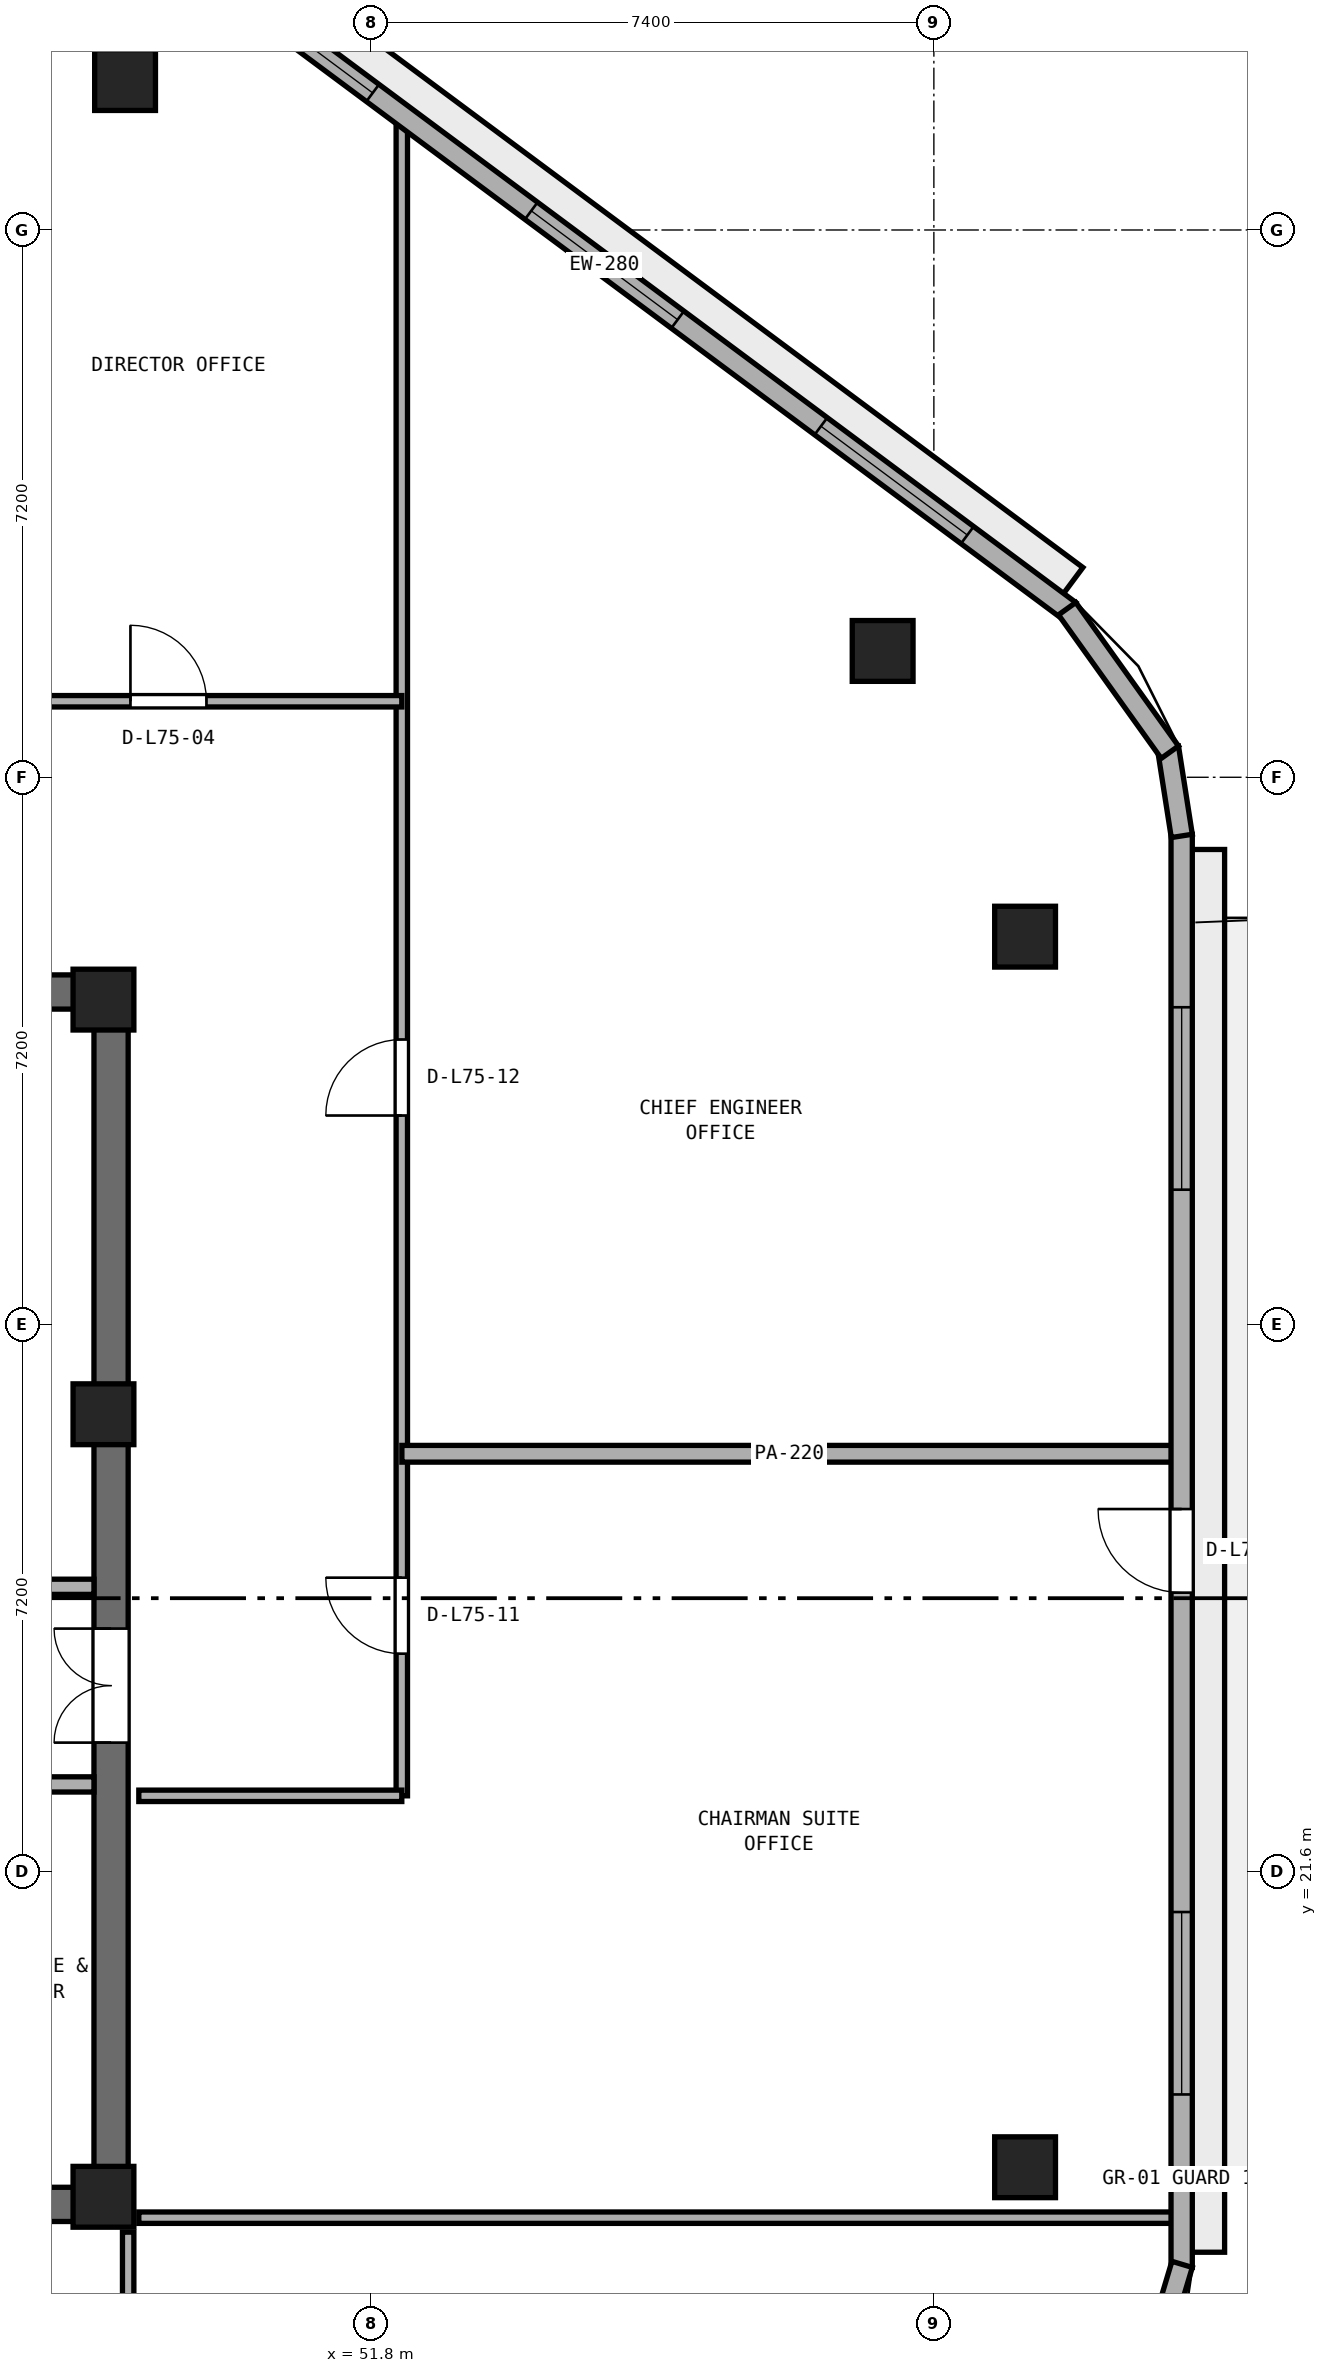
"""IFC4 building model, lengths in metres.
Left out: names, types, materials, properties, quantities, classifications, styles, units other than length and angle.
Written with IfcOpenShell. Run it as: python <this file> out.ifc"""

import sys

from ifc_helpers import new_model, si_unit, direction, frame, frame_2d, origin, origin_2d, place, context, subcontext, project, spatial, rectangle, extrude, element, fill, save


model = new_model("IFC4")
c1 = context("Model", 3, precision=1e-05, world=origin(), true_north=direction((0.0, 1.0)))
c2 = subcontext(c1, "Body", "Model", "MODEL_VIEW")
j1 = project(units=[si_unit("LENGTHUNIT", "METRE"), si_unit("PLANEANGLEUNIT", "RADIAN")], contexts=[c1])
p1 = place(None, origin())
s1 = spatial("IfcSite", under=j1, at=p1, CompositionType="ELEMENT")
p2 = place(p1, origin())
s2 = spatial("IfcBuilding", under=s1, at=p2, CompositionType="ELEMENT")
p3 = place(p2, frame((0.0, 0.0, 293.4)))
s3 = spatial("IfcBuildingStorey", under=s2, at=p3, CompositionType="ELEMENT", Elevation=293.4)
for number, where, z_axis, x_axis in (
    (1, (25.4, 17.225, 0.0), (0.0, 0.0, 1.0), (1.0, 0.0, 0.0)),
    (2, (25.4, 33.175, 0.0), (0.0, 0.0, 1.0), (1.0, 0.0, 0.0)),
):
    element("IfcWall", number, at=place(p3, frame(where, z_axis=z_axis, x_axis=x_axis)), inside=s3, PredefinedType="SHEAR", context=c2, shape_type="SweptSolid", body=[
        extrude(rectangle(XDim=23.2, YDim=0.45, at=frame_2d((11.6, 0.0))), origin(), (0.0, 0.0, 1.0), 3.54),
    ])
p4 = place(p3, frame((48.375, 17.45, 0.0), z_axis=(0.0, 0.0, 1.0), x_axis=(0.0, 1.0, 0.0)))
e3 = element("IfcWall", 3, at=p4, inside=s3, PredefinedType="SHEAR", context=c2, shape_type="SweptSolid", body=[
    extrude(rectangle(XDim=15.5, YDim=0.45, at=frame_2d((7.75, 0.0))), origin(), (0.0, 0.0, 1.0), 3.54),
])
p5 = place(p4, frame((5.85, 0.0, 0.0)))
e4 = element("IfcOpeningElement", 4, at=p5, cuts=e3, PredefinedType="OPENING", context=c2, shape_type="SweptSolid", body=[
    extrude(rectangle(XDim=1.5, YDim=2.15, at=frame_2d((0.75, 1.075))), frame((0.0, 0.235, 0.0), z_axis=(0.0, -1.0, 0.0), x_axis=(1.0, 0.0, 0.0)), (0.0, 0.0, 1.0), 0.47),
])
for number, where, z_axis, x_axis in (
    (5, (48.275, 17.325, 0.0), (0.0, 0.0, 1.0), (1.0, 0.0, 0.0)),
    (6, (48.275, 27.62, 0.0), (0.0, 0.0, 1.0), (1.0, 0.0, 0.0)),
    (7, (48.275, 33.075, 0.0), (0.0, 0.0, 1.0), (1.0, 0.0, 0.0)),
):
    element("IfcColumn", number, at=place(p3, frame(where, z_axis=z_axis, x_axis=x_axis)), inside=s3, PredefinedType="PILASTER", context=c2, shape_type="SweptSolid", body=[
        extrude(rectangle(XDim=0.8, YDim=0.8, at=origin_2d()), origin(), (0.0, 0.0, 1.0), 3.8),
    ])
for number, where, z_axis, x_axis in (
    (8, (60.4, 17.714, 0.0), (0.0, 0.0, 1.0), (1.0, 0.0, 0.0)),
    (9, (60.4, 33.903, 0.0), (0.0, 0.0, 1.0), (1.0, 0.0, 0.0)),
    (10, (58.526, 37.662, 0.0), (0.0, 0.0, 1.0), (1.0, 0.0, 0.0)),
    (11, (48.559, 45.173, 0.0), (0.0, 0.0, 1.0), (1.0, 0.0, 0.0)),
):
    element("IfcColumn", number, at=place(p3, frame(where, z_axis=z_axis, x_axis=x_axis)), inside=s3, PredefinedType="COLUMN", context=c2, shape_type="SweptSolid", body=[
        extrude(rectangle(XDim=0.8, YDim=0.8, at=origin_2d()), origin(), (0.0, 0.0, 1.0), 3.8),
    ])
p6 = place(p3, frame((42.0, 22.75, 0.0), z_axis=(0.0, 0.0, 1.0), x_axis=(1.0, 0.0, 0.0)))
e12 = element("IfcWall", 12, at=p6, inside=s3, PredefinedType="SOLIDWALL", context=c2, shape_type="SweptSolid", body=[
    extrude(rectangle(XDim=6.15, YDim=0.2, at=frame_2d((3.075, 0.0))), origin(), (0.0, 0.0, 1.0), 3.54),
])
p7 = place(p3, frame((46.1, 25.35, 0.0), z_axis=(0.0, 0.0, 1.0), x_axis=(1.0, 0.0, 0.0)))
e13 = element("IfcWall", 13, at=p7, inside=s3, PredefinedType="SOLIDWALL", context=c2, shape_type="SweptSolid", body=[
    extrude(rectangle(XDim=2.05, YDim=0.2, at=frame_2d((1.025, 0.0))), origin(), (0.0, 0.0, 1.0), 3.54),
])
p8 = place(p3, frame((52.2, 22.6, 0.0), z_axis=(0.0, 0.0, 1.0), x_axis=(0.0, 1.0, 0.0)))
e14 = element("IfcWall", 14, at=p8, inside=s3, PredefinedType="PARTITIONING", context=c2, shape_type="SweptSolid", body=[
    extrude(rectangle(XDim=22.153, YDim=0.15, at=frame_2d((11.076, 0.0))), origin(), (0.0, 0.0, 1.0), 3.54),
])
p9 = place(p8, frame((1.87, 0.0, 0.0)))
e15 = element("IfcOpeningElement", 15, at=p9, cuts=e14, PredefinedType="OPENING", context=c2, shape_type="SweptSolid", body=[
    extrude(rectangle(XDim=1.0, YDim=2.12, at=frame_2d((0.5, 1.06))), frame((0.0, 0.085, 0.0), z_axis=(0.0, -1.0, 0.0), x_axis=(1.0, 0.0, 0.0)), (0.0, 0.0, 1.0), 0.17),
])
p10 = place(p8, frame((8.95, 0.0, 0.0)))
e16 = element("IfcOpeningElement", 16, at=p10, cuts=e14, PredefinedType="OPENING", context=c2, shape_type="SweptSolid", body=[
    extrude(rectangle(XDim=1.0, YDim=2.12, at=frame_2d((0.5, 1.06))), frame((0.0, 0.085, 0.0), z_axis=(0.0, -1.0, 0.0), x_axis=(1.0, 0.0, 0.0)), (0.0, 0.0, 1.0), 0.17),
])
p11 = place(p3, frame((48.6, 13.4, 0.0), z_axis=(0.0, 0.0, 1.0), x_axis=(0.0, 1.0, 0.0)))
e17 = element("IfcWall", 17, at=p11, inside=s3, PredefinedType="PARTITIONING", context=c2, shape_type="SweptSolid", body=[
    extrude(rectangle(XDim=3.46, YDim=0.15, at=frame_2d((1.73, 0.0))), origin(), (0.0, 0.0, 1.0), 3.54),
])
p12 = place(p3, frame((48.74, 17.05, 0.0), z_axis=(0.0, 0.0, 1.0), x_axis=(1.0, 0.0, 0.0)))
e18 = element("IfcWall", 18, at=p12, inside=s3, PredefinedType="PARTITIONING", context=c2, shape_type="SweptSolid", body=[
    extrude(rectangle(XDim=13.655, YDim=0.15, at=frame_2d((6.828, 0.0))), origin(), (0.0, 0.0, 1.0), 2.923),
])
p13 = place(p3, frame((48.74, 22.6, 0.0), z_axis=(0.0, 0.0, 1.0), x_axis=(1.0, 0.0, 0.0)))
e19 = element("IfcWall", 19, at=p13, inside=s3, PredefinedType="PARTITIONING", context=c2, shape_type="SweptSolid", body=[
    extrude(rectangle(XDim=3.46, YDim=0.15, at=frame_2d((1.73, 0.0))), origin(), (0.0, 0.0, 1.0), 3.54),
])
p14 = place(p3, frame((52.201, 27.1, 0.0), z_axis=(0.0, 0.0, 1.0), x_axis=(1.0, 0.0, 0.0)))
e20 = element("IfcWall", 20, at=p14, inside=s3, PredefinedType="PARTITIONING", context=c2, shape_type="SweptSolid", body=[
    extrude(rectangle(XDim=10.194, YDim=0.22, at=frame_2d((5.097, 0.0))), origin(), (0.0, 0.0, 1.0), 3.54),
])
p15 = place(p3, frame((38.35, 37.0, 0.0), z_axis=(0.0, 0.0, 1.0), x_axis=(1.0, 0.0, 0.0)))
e21 = element("IfcWall", 21, at=p15, inside=s3, PredefinedType="PARTITIONING", context=c2, shape_type="SweptSolid", body=[
    extrude(rectangle(XDim=13.85, YDim=0.15, at=frame_2d((6.925, 0.0))), origin(), (0.0, 0.0, 1.0), 3.54),
])
p16 = place(p15, frame((10.28, 0.0, 0.0)))
e22 = element("IfcOpeningElement", 22, at=p16, cuts=e21, PredefinedType="OPENING", context=c2, shape_type="SweptSolid", body=[
    extrude(rectangle(XDim=1.0, YDim=2.12, at=frame_2d((0.5, 1.06))), frame((0.0, 0.085, 0.0), z_axis=(0.0, -1.0, 0.0), x_axis=(1.0, 0.0, 0.0)), (0.0, 0.0, 1.0), 0.17),
])
p17 = place(p3, frame((62.46, 16.396, 0.0), z_axis=(0.0, 0.0, 1.0), x_axis=(0.0, 1.0, 0.0)))
e23 = element("IfcWall", 23, at=p17, inside=s3, PredefinedType="STANDARD", context=c2, shape_type="SweptSolid", body=[
    extrude(rectangle(XDim=18.854, YDim=0.28, at=frame_2d((9.427, 0.0))), origin(), (0.0, 0.0, 1.0), 3.54),
])
p18 = place(p17, frame((8.877, 0.0, 0.0)))
e24 = element("IfcOpeningElement", 24, at=p18, cuts=e23, PredefinedType="OPENING", context=c2, shape_type="SweptSolid", body=[
    extrude(rectangle(XDim=1.1, YDim=2.2, at=frame_2d((0.55, 1.1))), frame((0.0, 0.15, 0.0), z_axis=(0.0, -1.0, 0.0), x_axis=(1.0, 0.0, 0.0)), (0.0, 0.0, 1.0), 0.3),
])
p19 = place(p17, frame((2.276, 0.0, 0.9)))
e25 = element("IfcOpeningElement", 25, at=p19, cuts=e23, PredefinedType="OPENING", context=c2, shape_type="SweptSolid", body=[
    extrude(rectangle(XDim=2.4, YDim=1.75, at=frame_2d((1.2, 0.875))), frame((0.0, 0.15, 0.0), z_axis=(0.0, -1.0, 0.0), x_axis=(1.0, 0.0, 0.0)), (0.0, 0.0, 1.0), 0.3),
])
p20 = place(p17, frame((14.179, 0.0, 0.9)))
e26 = element("IfcOpeningElement", 26, at=p20, cuts=e23, PredefinedType="OPENING", context=c2, shape_type="SweptSolid", body=[
    extrude(rectangle(XDim=2.4, YDim=1.75, at=frame_2d((1.2, 0.875))), frame((0.0, 0.15, 0.0), z_axis=(0.0, -1.0, 0.0), x_axis=(1.0, 0.0, 0.0)), (0.0, 0.0, 1.0), 0.3),
])
p21 = place(p3, frame((60.984, 38.187, 0.0), z_axis=(0.0, 0.0, 1.0), x_axis=(-0.802485144343, 0.596672098484, 0.0)))
e27 = element("IfcWall", 27, at=p21, inside=s3, PredefinedType="STANDARD", context=c2, shape_type="SweptSolid", body=[
    extrude(rectangle(XDim=15.248, YDim=0.28, at=frame_2d((7.624, 0.0))), origin(), (0.0, 0.0, 1.0), 3.54),
])
p22 = place(p21, frame((1.675, 0.0, 0.9)))
e28 = element("IfcOpeningElement", 28, at=p22, cuts=e27, PredefinedType="OPENING", context=c2, shape_type="SweptSolid", body=[
    extrude(rectangle(XDim=2.4, YDim=1.75, at=frame_2d((1.2, 0.875))), frame((0.0, 0.15, 0.0), z_axis=(0.0, -1.0, 0.0), x_axis=(1.0, 0.0, 0.0)), (0.0, 0.0, 1.0), 0.3),
])
p23 = place(p21, frame((6.424, 0.0, 0.9)))
e29 = element("IfcOpeningElement", 29, at=p23, cuts=e27, PredefinedType="OPENING", context=c2, shape_type="SweptSolid", body=[
    extrude(rectangle(XDim=2.4, YDim=1.75, at=frame_2d((1.2, 0.875))), frame((0.0, 0.15, 0.0), z_axis=(0.0, -1.0, 0.0), x_axis=(1.0, 0.0, 0.0)), (0.0, 0.0, 1.0), 0.3),
])
p24 = place(p21, frame((11.423, 0.0, 0.9)))
e30 = element("IfcOpeningElement", 30, at=p24, cuts=e27, PredefinedType="OPENING", context=c2, shape_type="SweptSolid", body=[
    extrude(rectangle(XDim=2.4, YDim=1.75, at=frame_2d((1.2, 0.875))), frame((0.0, 0.15, 0.0), z_axis=(0.0, -1.0, 0.0), x_axis=(1.0, 0.0, 0.0)), (0.0, 0.0, 1.0), 0.3),
])
p25 = place(p3, frame((61.839, 14.344, 0.0), z_axis=(0.0, 0.0, 1.0), x_axis=(0.287235049694, 0.957860128739, 0.0)))
e31 = element("IfcWall", 31, at=p25, inside=s3, PredefinedType="STANDARD", context=c2, shape_type="SweptSolid", body=[
    extrude(rectangle(XDim=2.184, YDim=0.28, at=frame_2d((1.092, 0.0))), origin(), (0.0, 0.0, 1.0), 3.54),
])
p26 = place(p3, frame((62.462, 35.229, 0.0), z_axis=(0.0, 0.0, 1.0), x_axis=(-0.15458604025, 0.987979329824, 0.0)))
e32 = element("IfcWall", 32, at=p26, inside=s3, PredefinedType="STANDARD", context=c2, shape_type="SweptSolid", body=[
    extrude(rectangle(XDim=1.175, YDim=0.28, at=frame_2d((0.587, 0.0))), origin(), (0.0, 0.0, 1.0), 3.54),
])
p27 = place(p3, frame((62.304, 36.33, 0.0), z_axis=(0.0, 0.0, 1.0), x_axis=(-0.581795068472, 0.81333541562, 0.0)))
e33 = element("IfcWall", 33, at=p27, inside=s3, PredefinedType="STANDARD", context=c2, shape_type="SweptSolid", body=[
    extrude(rectangle(XDim=2.322, YDim=0.28, at=frame_2d((1.161, 0.0))), origin(), (0.0, 0.0, 1.0), 3.54),
])
p28 = place(p5, origin())
e34 = element("IfcDoor", 34, at=p28, inside=s3, OperationType="DOUBLE_DOOR_SINGLE_SWING", PredefinedType="DOOR", context=c2, shape_type="SweptSolid", body=[
    extrude(rectangle(XDim=1.5, YDim=2.15, at=frame_2d((0.75, 1.075))), frame((0.0, 0.025, 0.0), z_axis=(0.0, -1.0, 0.0), x_axis=(1.0, 0.0, 0.0)), (0.0, 0.0, 1.0), 0.05),
])
fill(e4, e34)
p29 = place(p16, origin())
e35 = element("IfcDoor", 35, at=p29, inside=s3, OperationType="SINGLE_SWING_LEFT", PredefinedType="DOOR", context=c2, shape_type="SweptSolid", body=[
    extrude(rectangle(XDim=1.0, YDim=2.12, at=frame_2d((0.5, 1.06))), frame((0.0, 0.025, 0.0), z_axis=(0.0, -1.0, 0.0), x_axis=(1.0, 0.0, 0.0)), (0.0, 0.0, 1.0), 0.05),
])
fill(e22, e35)
p30 = place(p9, origin())
e36 = element("IfcDoor", 36, at=p30, inside=s3, OperationType="SINGLE_SWING_RIGHT", PredefinedType="DOOR", context=c2, shape_type="SweptSolid", body=[
    extrude(rectangle(XDim=1.0, YDim=2.12, at=frame_2d((0.5, 1.06))), frame((0.0, 0.025, 0.0), z_axis=(0.0, -1.0, 0.0), x_axis=(1.0, 0.0, 0.0)), (0.0, 0.0, 1.0), 0.05),
])
fill(e15, e36)
p31 = place(p10, origin())
e37 = element("IfcDoor", 37, at=p31, inside=s3, OperationType="SINGLE_SWING_LEFT", PredefinedType="DOOR", context=c2, shape_type="SweptSolid", body=[
    extrude(rectangle(XDim=1.0, YDim=2.12, at=frame_2d((0.5, 1.06))), frame((0.0, 0.025, 0.0), z_axis=(0.0, -1.0, 0.0), x_axis=(1.0, 0.0, 0.0)), (0.0, 0.0, 1.0), 0.05),
])
fill(e16, e37)
p32 = place(p18, origin())
e38 = element("IfcDoor", 38, at=p32, inside=s3, OperationType="SINGLE_SWING_RIGHT", PredefinedType="DOOR", context=c2, shape_type="SweptSolid", body=[
    extrude(rectangle(XDim=1.1, YDim=2.2, at=frame_2d((0.55, 1.1))), frame((0.0, 0.025, 0.0), z_axis=(0.0, -1.0, 0.0), x_axis=(1.0, 0.0, 0.0)), (0.0, 0.0, 1.0), 0.05),
])
fill(e24, e38)
p33 = place(p19, origin())
e39 = element("IfcWindow", 39, at=p33, inside=s3, PartitioningType="SINGLE_PANEL", PredefinedType="WINDOW", context=c2, shape_type="SweptSolid", body=[
    extrude(rectangle(XDim=2.4, YDim=1.75, at=frame_2d((1.2, 0.875))), frame((0.0, 0.03, 0.0), z_axis=(0.0, -1.0, 0.0), x_axis=(1.0, 0.0, 0.0)), (0.0, 0.0, 1.0), 0.06),
])
fill(e25, e39)
p34 = place(p20, origin())
e40 = element("IfcWindow", 40, at=p34, inside=s3, PartitioningType="SINGLE_PANEL", PredefinedType="WINDOW", context=c2, shape_type="SweptSolid", body=[
    extrude(rectangle(XDim=2.4, YDim=1.75, at=frame_2d((1.2, 0.875))), frame((0.0, 0.03, 0.0), z_axis=(0.0, -1.0, 0.0), x_axis=(1.0, 0.0, 0.0)), (0.0, 0.0, 1.0), 0.06),
])
fill(e26, e40)
p35 = place(p22, origin())
e41 = element("IfcWindow", 41, at=p35, inside=s3, PartitioningType="SINGLE_PANEL", PredefinedType="WINDOW", context=c2, shape_type="SweptSolid", body=[
    extrude(rectangle(XDim=2.4, YDim=1.75, at=frame_2d((1.2, 0.875))), frame((0.0, 0.03, 0.0), z_axis=(0.0, -1.0, 0.0), x_axis=(1.0, 0.0, 0.0)), (0.0, 0.0, 1.0), 0.06),
])
fill(e28, e41)
p36 = place(p23, origin())
e42 = element("IfcWindow", 42, at=p36, inside=s3, PartitioningType="SINGLE_PANEL", PredefinedType="WINDOW", context=c2, shape_type="SweptSolid", body=[
    extrude(rectangle(XDim=2.4, YDim=1.75, at=frame_2d((1.2, 0.875))), frame((0.0, 0.03, 0.0), z_axis=(0.0, -1.0, 0.0), x_axis=(1.0, 0.0, 0.0)), (0.0, 0.0, 1.0), 0.06),
])
fill(e29, e42)
p37 = place(p24, origin())
e43 = element("IfcWindow", 43, at=p37, inside=s3, PartitioningType="SINGLE_PANEL", PredefinedType="WINDOW", context=c2, shape_type="SweptSolid", body=[
    extrude(rectangle(XDim=2.4, YDim=1.75, at=frame_2d((1.2, 0.875))), frame((0.0, 0.03, 0.0), z_axis=(0.0, -1.0, 0.0), x_axis=(1.0, 0.0, 0.0)), (0.0, 0.0, 1.0), 0.06),
])
fill(e30, e43)
save(model, sys.argv[1])
